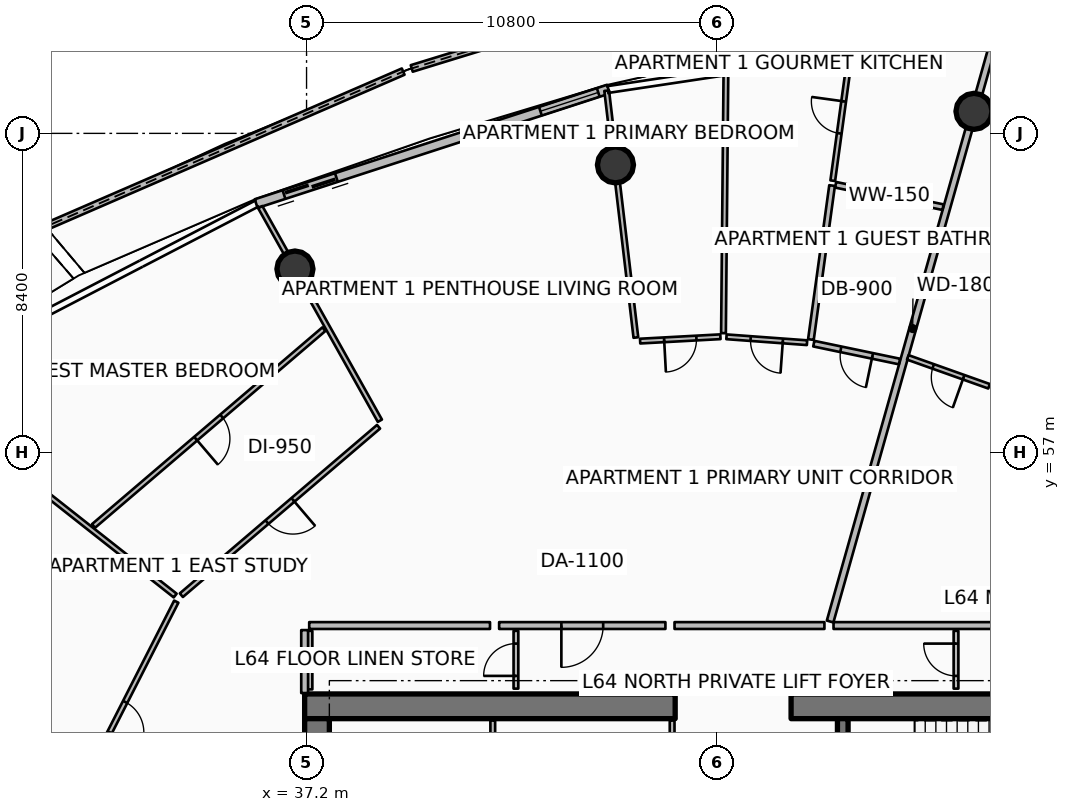
"""IFC4 building model, lengths in metres.
Left out: names, types, materials, properties, quantities, classifications, styles, units other than length and angle.
Written with IfcOpenShell. Run it as: python <this file> out.ifc"""

import sys

from ifc_helpers import new_model, si_unit, direction, frame, frame_2d, origin, origin_2d, place, context, subcontext, project, spatial, polyline, rectangle, circle, outline, extrude, element, fill, save


model = new_model("IFC4")
c1 = context("Model", 3, precision=1e-05, world=origin(), true_north=direction((0.0, 1.0)))
c2 = subcontext(c1, "Body", "Model", "MODEL_VIEW")
j1 = project(units=[si_unit("LENGTHUNIT", "METRE"), si_unit("PLANEANGLEUNIT", "RADIAN")], contexts=[c1])
p1 = place(None, origin())
s1 = spatial("IfcSite", under=j1, at=p1, CompositionType="ELEMENT")
p2 = place(p1, origin())
s2 = spatial("IfcBuilding", under=s1, at=p2, CompositionType="ELEMENT")
p3 = place(p2, frame((0.0, 0.0, 255.95)))
s3 = spatial("IfcBuildingStorey", under=s2, at=p3, CompositionType="ELEMENT", Elevation=255.95)
for number, where, z_axis, x_axis in (
    (1, (37.15, 50.325, 0.0), (0.0, 0.0, 1.0), (1.0, 0.0, 0.0)),
    (2, (49.95, 50.325, 0.0), (0.0, 0.0, 1.0), (1.0, 0.0, 0.0)),
):
    element("IfcWall", number, at=place(p3, frame(where, z_axis=z_axis, x_axis=x_axis)), inside=s3, PredefinedType="SHEAR", context=c2, shape_type="SweptSolid", body=[
        extrude(rectangle(XDim=9.75, YDim=0.65, at=frame_2d((4.875, 0.0))), origin(), (0.0, 0.0, 1.0), 3.85),
    ])
p4 = place(p3, frame((37.475, 34.0, 0.0), z_axis=(0.0, 0.0, 1.0), x_axis=(0.0, 1.0, 0.0)))
e3 = element("IfcWall", 3, at=p4, inside=s3, PredefinedType="SHEAR", context=c2, shape_type="SweptSolid", body=[
    extrude(rectangle(XDim=16.0, YDim=0.65, at=frame_2d((8.0, 0.0))), origin(), (0.0, 0.0, 1.0), 3.85),
])
p5 = place(p3, frame((51.31, 46.5, 0.0), z_axis=(0.0, 0.0, 1.0), x_axis=(0.0, 1.0, 0.0)))
e4 = element("IfcWall", 4, at=p5, inside=s3, PredefinedType="SHEAR", context=c2, shape_type="SweptSolid", body=[
    extrude(rectangle(XDim=3.5, YDim=0.28, at=frame_2d((1.75, 0.0))), origin(), (0.0, 0.0, 1.0), 3.85),
])
for number, where, z_axis, x_axis in (
    (5, (54.763, 65.979, 0.0), (0.0, 0.0, 1.0), (1.0, 0.0, 0.0)),
    (6, (45.329, 64.571, 0.0), (0.0, 0.0, 1.0), (1.0, 0.0, 0.0)),
    (7, (36.895, 61.83, 0.0), (0.0, 0.0, 1.0), (1.0, 0.0, 0.0)),
):
    element("IfcColumn", number, at=place(p3, frame(where, z_axis=z_axis, x_axis=x_axis)), inside=s3, PredefinedType="COLUMN", context=c2, shape_type="SweptSolid", body=[
        extrude(circle(Radius=0.475, at=origin_2d()), origin(), (0.0, 0.0, 1.0), 3.59),
    ])
p6 = place(p3, frame((50.047, 70.206, 0.0), z_axis=(0.0, 0.0, 1.0), x_axis=(-0.955884083791, -0.293744137565, 0.0)))
e8 = element("IfcWall", 8, at=p6, inside=s3, PredefinedType="PARAPET", context=c2, shape_type="SweptSolid", body=[
    extrude(outline(polyline([(0.0, 0.0), (10.544, 0.0), (10.544, 1.348), (5.272, 1.562), (0.0, 1.747), (0.0, 0.0)])), frame((0.0, 0.09, 0.0), z_axis=(0.0, -1.0, 0.0), x_axis=(1.0, 0.0, 0.0)), (0.0, 0.0, 1.0), 0.18),
])
p7 = place(p3, frame((39.743, 67.026, 0.0), z_axis=(0.0, 0.0, 1.0), x_axis=(-0.917372888721, -0.398028872119, 0.0)))
e9 = element("IfcWall", 9, at=p7, inside=s3, PredefinedType="PARAPET", context=c2, shape_type="SweptSolid", body=[
    extrude(outline(polyline([(0.0, 0.0), (10.258, 0.0), (10.257, 1.12), (5.129, 1.182), (0.0, 1.348), (0.0, 0.0)])), frame((0.0, 0.09, 0.0), z_axis=(0.0, -1.0, 0.0), x_axis=(1.0, 0.0, 0.0)), (0.0, 0.0, 1.0), 0.18),
])
p8 = place(p3, frame((45.142, 66.564, 0.0), z_axis=(0.0, 0.0, 1.0), x_axis=(-0.951055974609, -0.309018661507, 0.0)))
e10 = element("IfcWall", 10, at=p8, inside=s3, PredefinedType="SOLIDWALL", context=c2, shape_type="SweptSolid", body=[
    extrude(rectangle(XDim=9.745, YDim=0.24, at=frame_2d((4.873, 0.0))), origin(), (0.0, 0.0, 1.0), 2.54),
])
p9 = place(p8, frame((7.525, 0.0, 0.0)))
e11 = element("IfcOpeningElement", 11, at=p9, cuts=e10, PredefinedType="OPENING", context=c2, shape_type="SweptSolid", body=[
    extrude(rectangle(XDim=1.45, YDim=2.15, at=frame_2d((0.725, 1.075))), frame((0.0, 0.13, 0.0), z_axis=(0.0, -1.0, 0.0), x_axis=(1.0, 0.0, 0.0)), (0.0, 0.0, 1.0), 0.26),
])
p10 = place(p8, frame((0.28, 0.0, 0.65)))
e12 = element("IfcOpeningElement", 12, at=p10, cuts=e10, PredefinedType="OPENING", context=c2, shape_type="SweptSolid", body=[
    extrude(rectangle(XDim=1.6, YDim=1.5, at=frame_2d((0.8, 0.75))), frame((0.0, 0.13, 0.0), z_axis=(0.0, -1.0, 0.0), x_axis=(1.0, 0.0, 0.0)), (0.0, 0.0, 1.0), 0.26),
])
for number, where, z_axis, x_axis in (
    (13, (46.82, 47.92, 0.0), (0.0, 0.0, 1.0), (0.0, 1.0, 0.0)),
    (14, (42.1, 47.92, 0.0), (0.0, 0.0, 1.0), (0.0, 1.0, 0.0)),
):
    element("IfcWall", number, at=place(p3, frame(where, z_axis=z_axis, x_axis=x_axis)), inside=s3, PredefinedType="PARTITIONING", context=c2, shape_type="SweptSolid", body=[
        extrude(rectangle(XDim=2.03, YDim=0.125, at=frame_2d((1.015, 0.0))), origin(), (0.0, 0.0, 1.0), 3.03),
    ])
p11 = place(p3, frame((37.29, 50.77, 0.0), z_axis=(0.0, 0.0, 1.0), x_axis=(0.0, 1.0, 0.0)))
e15 = element("IfcWall", 15, at=p11, inside=s3, PredefinedType="PARTITIONING", context=c2, shape_type="SweptSolid", body=[
    extrude(rectangle(XDim=1.54, YDim=0.125, at=frame_2d((0.77, 0.0))), origin(), (0.0, 0.0, 1.0), 3.03),
])
p12 = place(p3, frame((42.71, 50.79, 0.0), z_axis=(0.0, 0.0, 1.0), x_axis=(0.0, 1.0, 0.0)))
e16 = element("IfcWall", 16, at=p12, inside=s3, PredefinedType="PARTITIONING", context=c2, shape_type="SweptSolid", body=[
    extrude(rectangle(XDim=1.52, YDim=0.125, at=frame_2d((0.76, 0.0))), origin(), (0.0, 0.0, 1.0), 2.957),
])
p13 = place(p12, frame((0.335, 0.0, 0.0)))
e17 = element("IfcOpeningElement", 17, at=p13, cuts=e16, PredefinedType="OPENING", context=c2, shape_type="SweptSolid", body=[
    extrude(rectangle(XDim=0.85, YDim=2.06, at=frame_2d((0.425, 1.03))), frame((0.0, 0.073, 0.0), z_axis=(0.0, -1.0, 0.0), x_axis=(1.0, 0.0, 0.0)), (0.0, 0.0, 1.0), 0.145),
])
p14 = place(p3, frame((54.29, 50.79, 0.0), z_axis=(0.0, 0.0, 1.0), x_axis=(0.0, 1.0, 0.0)))
e18 = element("IfcWall", 18, at=p14, inside=s3, PredefinedType="PARTITIONING", context=c2, shape_type="SweptSolid", body=[
    extrude(rectangle(XDim=1.52, YDim=0.125, at=frame_2d((0.76, 0.0))), origin(), (0.0, 0.0, 1.0), 3.03),
])
p15 = place(p14, frame((0.335, 0.0, 0.0)))
e19 = element("IfcOpeningElement", 19, at=p15, cuts=e18, PredefinedType="OPENING", context=c2, shape_type="SweptSolid", body=[
    extrude(rectangle(XDim=0.85, YDim=2.06, at=frame_2d((0.425, 1.03))), frame((0.0, 0.073, 0.0), z_axis=(0.0, -1.0, 0.0), x_axis=(1.0, 0.0, 0.0)), (0.0, 0.0, 1.0), 0.145),
])
p16 = place(p3, frame((50.977, 52.556, 0.0), z_axis=(0.0, 0.0, 1.0), x_axis=(0.271442063103, 0.962454781472, 0.0)))
e20 = element("IfcWall", 20, at=p16, inside=s3, PredefinedType="PARTITIONING", context=c2, shape_type="SweptSolid", body=[
    extrude(rectangle(XDim=16.017, YDim=0.18, at=frame_2d((8.008, 0.0))), origin(), (0.0, 0.0, 1.0), 2.957),
])
p17 = place(p3, frame((46.643, 52.45, 0.0), z_axis=(0.0, 0.0, 1.0), x_axis=(-1.0, 0.0, 0.0)))
e21 = element("IfcWall", 21, at=p17, inside=s3, PredefinedType="PARTITIONING", context=c2, shape_type="SweptSolid", body=[
    extrude(rectangle(XDim=4.376, YDim=0.18, at=frame_2d((2.188, 0.0))), origin(), (0.0, 0.0, 1.0), 2.957),
])
p18 = place(p17, frame((1.638, 0.0, 0.0)))
e22 = element("IfcOpeningElement", 22, at=p18, cuts=e21, PredefinedType="OPENING", context=c2, shape_type="SweptSolid", body=[
    extrude(rectangle(XDim=1.1, YDim=2.1, at=frame_2d((0.55, 1.05))), frame((0.0, 0.1, 0.0), z_axis=(0.0, -1.0, 0.0), x_axis=(1.0, 0.0, 0.0)), (0.0, 0.0, 1.0), 0.2),
])
p19 = place(p3, frame((50.827, 52.45, 0.0), z_axis=(0.0, 0.0, 1.0), x_axis=(-1.0, 0.0, 0.0)))
e23 = element("IfcWall", 23, at=p19, inside=s3, PredefinedType="PARTITIONING", context=c2, shape_type="SweptSolid", body=[
    extrude(rectangle(XDim=3.944, YDim=0.18, at=frame_2d((1.972, 0.0))), origin(), (0.0, 0.0, 1.0), 2.957),
])
p20 = place(p3, frame((45.866, 60.028, 0.0), z_axis=(0.0, 0.0, 1.0), x_axis=(-0.117545094797, 0.993067545885, 0.0)))
e24 = element("IfcWall", 24, at=p20, inside=s3, PredefinedType="PARTITIONING", context=c2, shape_type="SweptSolid", body=[
    extrude(rectangle(XDim=6.541, YDim=0.125, at=frame_2d((3.27, 0.0))), origin(), (0.0, 0.0, 1.0), 2.957),
])
p21 = place(p3, frame((52.803, 59.396, 0.0), z_axis=(0.0, 0.0, 1.0), x_axis=(-0.978903645483, 0.204322423784, 0.0)))
e25 = element("IfcWall", 25, at=p21, inside=s3, PredefinedType="PARTITIONING", context=c2, shape_type="SweptSolid", body=[
    extrude(rectangle(XDim=2.304, YDim=0.15, at=frame_2d((1.152, 0.0))), origin(), (0.0, 0.0, 1.0), 2.957),
])
p22 = place(p21, frame((0.727, 0.0, 0.0)))
e26 = element("IfcOpeningElement", 26, at=p22, cuts=e25, PredefinedType="OPENING", context=c2, shape_type="SweptSolid", body=[
    extrude(rectangle(XDim=0.85, YDim=2.06, at=frame_2d((0.425, 1.03))), frame((0.0, 0.085, 0.0), z_axis=(0.0, -1.0, 0.0), x_axis=(1.0, 0.0, 0.0)), (0.0, 0.0, 1.0), 0.17),
])
p23 = place(p3, frame((53.948, 63.458, 0.0), z_axis=(0.0, 0.0, 1.0), x_axis=(-0.978900129076, 0.204339270075, 0.0)))
e27 = element("IfcWall", 27, at=p23, inside=s3, PredefinedType="PARTITIONING", context=c2, shape_type="SweptSolid", body=[
    extrude(rectangle(XDim=2.886, YDim=0.15, at=frame_2d((1.443, 0.0))), origin(), (0.0, 0.0, 1.0), 2.957),
])
p24 = place(p3, frame((50.472, 59.975, 0.0), z_axis=(0.0, 0.0, 1.0), x_axis=(0.136221269786, 0.990678437061, 0.0)))
e28 = element("IfcWall", 28, at=p24, inside=s3, PredefinedType="PARTITIONING", context=c2, shape_type="SweptSolid", body=[
    extrude(rectangle(XDim=4.09, YDim=0.15, at=frame_2d((2.045, 0.0))), origin(), (0.0, 0.0, 1.0), 3.03),
])
p25 = place(p3, frame((51.047, 64.156, 0.0), z_axis=(0.0, 0.0, 1.0), x_axis=(0.13615601298, 0.990687407879, 0.0)))
e29 = element("IfcWall", 29, at=p25, inside=s3, PredefinedType="PARTITIONING", context=c2, shape_type="SweptSolid", body=[
    extrude(rectangle(XDim=3.364, YDim=0.125, at=frame_2d((1.682, 0.0))), origin(), (0.0, 0.0, 1.0), 3.03),
])
p26 = place(p25, frame((1.257, 0.0, 0.0)))
e30 = element("IfcOpeningElement", 30, at=p26, cuts=e29, PredefinedType="OPENING", context=c2, shape_type="SweptSolid", body=[
    extrude(rectangle(XDim=0.85, YDim=2.06, at=frame_2d((0.425, 1.03))), frame((0.0, 0.073, 0.0), z_axis=(0.0, -1.0, 0.0), x_axis=(1.0, 0.0, 0.0)), (0.0, 0.0, 1.0), 0.145),
])
p27 = place(p3, frame((48.171, 60.143, 0.0), z_axis=(0.0, 0.0, 1.0), x_axis=(0.009441272277, 0.999955430196, 0.0)))
e31 = element("IfcWall", 31, at=p27, inside=s3, PredefinedType="PARTITIONING", context=c2, shape_type="SweptSolid", body=[
    extrude(rectangle(XDim=6.853, YDim=0.125, at=frame_2d((3.426, 0.0))), origin(), (0.0, 0.0, 1.0), 3.03),
])
p28 = place(p3, frame((50.37, 59.892, 0.0), z_axis=(0.0, 0.0, 1.0), x_axis=(-0.997336577358, 0.072936626353, 0.0)))
e32 = element("IfcWall", 32, at=p28, inside=s3, PredefinedType="PARTITIONING", context=c2, shape_type="SweptSolid", body=[
    extrude(rectangle(XDim=2.125, YDim=0.125, at=frame_2d((1.063, 0.0))), origin(), (0.0, 0.0, 1.0), 3.03),
])
p29 = place(p28, frame((0.638, 0.0, 0.0)))
e33 = element("IfcOpeningElement", 33, at=p29, cuts=e32, PredefinedType="OPENING", context=c2, shape_type="SweptSolid", body=[
    extrude(rectangle(XDim=0.85, YDim=2.06, at=frame_2d((0.425, 1.03))), frame((0.0, 0.073, 0.0), z_axis=(0.0, -1.0, 0.0), x_axis=(1.0, 0.0, 0.0)), (0.0, 0.0, 1.0), 0.145),
])
p30 = place(p3, frame((48.09, 60.049, 0.0), z_axis=(0.0, 0.0, 1.0), x_axis=(-0.998534362098, -0.054121416367, 0.0)))
e34 = element("IfcWall", 34, at=p30, inside=s3, PredefinedType="PARTITIONING", context=c2, shape_type="SweptSolid", body=[
    extrude(rectangle(XDim=2.116, YDim=0.125, at=frame_2d((1.058, 0.0))), origin(), (0.0, 0.0, 1.0), 3.03),
])
p31 = place(p30, frame((0.633, 0.0, 0.0)))
e35 = element("IfcOpeningElement", 35, at=p31, cuts=e34, PredefinedType="OPENING", context=c2, shape_type="SweptSolid", body=[
    extrude(rectangle(XDim=0.85, YDim=2.06, at=frame_2d((0.425, 1.03))), frame((0.0, 0.073, 0.0), z_axis=(0.0, -1.0, 0.0), x_axis=(1.0, 0.0, 0.0)), (0.0, 0.0, 1.0), 0.145),
])
p32 = place(p3, frame((42.028, 52.45, 0.0), z_axis=(0.0, 0.0, 1.0), x_axis=(-1.0, 0.0, 0.0)))
e36 = element("IfcWall", 36, at=p32, inside=s3, PredefinedType="PARTITIONING", context=c2, shape_type="SweptSolid", body=[
    extrude(rectangle(XDim=4.758, YDim=0.18, at=frame_2d((2.379, 0.0))), origin(), (0.0, 0.0, 1.0), 2.957),
])
p33 = place(p3, frame((37.15, 52.33, 0.0), z_axis=(0.0, 0.0, 1.0), x_axis=(0.0, -1.0, 0.0)))
e37 = element("IfcWall", 37, at=p33, inside=s3, PredefinedType="PARTITIONING", context=c2, shape_type="SweptSolid", body=[
    extrude(rectangle(XDim=1.656, YDim=0.18, at=frame_2d((0.828, 0.0))), origin(), (0.0, 0.0, 1.0), 2.957),
])
p34 = place(p3, frame((39.129, 57.839, 0.0), z_axis=(0.0, 0.0, 1.0), x_axis=(-0.488617220279, 0.872498259051, 0.0)))
e38 = element("IfcWall", 38, at=p34, inside=s3, PredefinedType="PARTITIONING", context=c2, shape_type="SweptSolid", body=[
    extrude(rectangle(XDim=6.441, YDim=0.125, at=frame_2d((3.22, 0.0))), origin(), (0.0, 0.0, 1.0), 2.957),
])
p35 = place(p3, frame((39.095, 57.681, 0.0), z_axis=(0.0, 0.0, 1.0), x_axis=(-0.760396866349, -0.649458702033, 0.0)))
e39 = element("IfcWall", 39, at=p35, inside=s3, PredefinedType="PARTITIONING", context=c2, shape_type="SweptSolid", body=[
    extrude(rectangle(XDim=6.824, YDim=0.125, at=frame_2d((3.412, 0.0))), origin(), (0.0, 0.0, 1.0), 2.957),
])
p36 = place(p35, frame((2.962, 0.0, 0.0)))
e40 = element("IfcOpeningElement", 40, at=p36, cuts=e39, PredefinedType="OPENING", context=c2, shape_type="SweptSolid", body=[
    extrude(rectangle(XDim=0.9, YDim=2.08, at=frame_2d((0.45, 1.04))), frame((0.0, 0.073, 0.0), z_axis=(0.0, -1.0, 0.0), x_axis=(1.0, 0.0, 0.0)), (0.0, 0.0, 1.0), 0.145),
])
p37 = place(p3, frame((37.657, 60.248, 0.0), z_axis=(0.0, 0.0, 1.0), x_axis=(-0.76041400447, -0.649438635905, 0.0)))
e41 = element("IfcWall", 41, at=p37, inside=s3, PredefinedType="PARTITIONING", context=c2, shape_type="SweptSolid", body=[
    extrude(rectangle(XDim=7.973, YDim=0.125, at=frame_2d((3.986, 0.0))), origin(), (0.0, 0.0, 1.0), 2.957),
])
p38 = place(p37, frame((3.536, 0.0, 0.0)))
e42 = element("IfcOpeningElement", 42, at=p38, cuts=e41, PredefinedType="OPENING", context=c2, shape_type="SweptSolid", body=[
    extrude(rectangle(XDim=0.9, YDim=2.08, at=frame_2d((0.45, 1.04))), frame((0.0, 0.073, 0.0), z_axis=(0.0, -1.0, 0.0), x_axis=(1.0, 0.0, 0.0)), (0.0, 0.0, 1.0), 0.145),
])
p39 = place(p3, frame((33.743, 53.239, 0.0), z_axis=(0.0, 0.0, 1.0), x_axis=(-0.785324118062, 0.619084832305, 0.0)))
e43 = element("IfcWall", 43, at=p39, inside=s3, PredefinedType="PARTITIONING", context=c2, shape_type="SweptSolid", body=[
    extrude(rectangle(XDim=8.931, YDim=0.125, at=frame_2d((4.465, 0.0))), origin(), (0.0, 0.0, 1.0), 2.957),
])
p40 = place(p3, frame((33.772, 53.079, 0.0), z_axis=(0.0, 0.0, 1.0), x_axis=(-0.454012060349, -0.890995538181, 0.0)))
e44 = element("IfcWall", 44, at=p40, inside=s3, PredefinedType="PARTITIONING", context=c2, shape_type="SweptSolid", body=[
    extrude(rectangle(XDim=6.824, YDim=0.125, at=frame_2d((3.412, 0.0))), origin(), (0.0, 0.0, 1.0), 2.957),
])
p41 = place(p40, frame((2.962, 0.0, 0.0)))
e45 = element("IfcOpeningElement", 45, at=p41, cuts=e44, PredefinedType="OPENING", context=c2, shape_type="SweptSolid", body=[
    extrude(rectangle(XDim=0.9, YDim=2.08, at=frame_2d((0.45, 1.04))), frame((0.0, 0.073, 0.0), z_axis=(0.0, -1.0, 0.0), x_axis=(1.0, 0.0, 0.0)), (0.0, 0.0, 1.0), 0.145),
])
p42 = place(p3, frame((30.528, 46.928, 0.0), z_axis=(0.0, 0.0, 1.0), x_axis=(-0.962454146261, 0.271444315367, 0.0)))
e46 = element("IfcWall", 46, at=p42, inside=s3, PredefinedType="PARTITIONING", context=c2, shape_type="SweptSolid", body=[
    extrude(rectangle(XDim=11.342, YDim=0.125, at=frame_2d((5.671, 0.0))), origin(), (0.0, 0.0, 1.0), 2.957),
])
p43 = place(p3, frame((56.118, 52.45, 0.0), z_axis=(0.0, 0.0, 1.0), x_axis=(-1.0, 0.0, 0.0)))
e47 = element("IfcWall", 47, at=p43, inside=s3, PredefinedType="PARTITIONING", context=c2, shape_type="SweptSolid", body=[
    extrude(rectangle(XDim=5.051, YDim=0.18, at=frame_2d((2.525, 0.0))), origin(), (0.0, 0.0, 1.0), 2.957),
])
p44 = place(p3, frame((55.159, 58.746, 0.0), z_axis=(0.0, 0.0, 1.0), x_axis=(-0.942227512781, 0.334973602181, 0.0)))
e48 = element("IfcWall", 48, at=p44, inside=s3, PredefinedType="PARTITIONING", context=c2, shape_type="SweptSolid", body=[
    extrude(rectangle(XDim=2.27, YDim=0.125, at=frame_2d((1.135, 0.0))), origin(), (0.0, 0.0, 1.0), 2.957),
])
p45 = place(p44, frame((0.71, 0.0, 0.0)))
e49 = element("IfcOpeningElement", 49, at=p45, cuts=e48, PredefinedType="OPENING", context=c2, shape_type="SweptSolid", body=[
    extrude(rectangle(XDim=0.85, YDim=2.06, at=frame_2d((0.425, 1.03))), frame((0.0, 0.073, 0.0), z_axis=(0.0, -1.0, 0.0), x_axis=(1.0, 0.0, 0.0)), (0.0, 0.0, 1.0), 0.145),
])
p46 = place(p9, origin())
e50 = element("IfcDoor", 50, at=p46, inside=s3, OperationType="DOUBLE_DOOR_SLIDING", PredefinedType="DOOR", context=c2, shape_type="SweptSolid", body=[
    extrude(rectangle(XDim=1.45, YDim=2.15, at=frame_2d((0.725, 1.075))), frame((0.0, 0.025, 0.0), z_axis=(0.0, -1.0, 0.0), x_axis=(1.0, 0.0, 0.0)), (0.0, 0.0, 1.0), 0.05),
])
fill(e11, e50)
p47 = place(p10, origin())
e51 = element("IfcWindow", 51, at=p47, inside=s3, PartitioningType="SINGLE_PANEL", PredefinedType="WINDOW", context=c2, shape_type="SweptSolid", body=[
    extrude(rectangle(XDim=1.6, YDim=1.5, at=frame_2d((0.8, 0.75))), frame((0.0, 0.03, 0.0), z_axis=(0.0, -1.0, 0.0), x_axis=(1.0, 0.0, 0.0)), (0.0, 0.0, 1.0), 0.06),
])
fill(e12, e51)
p48 = place(p13, origin())
e52 = element("IfcDoor", 52, at=p48, inside=s3, OperationType="SINGLE_SWING_LEFT", PredefinedType="DOOR", context=c2, shape_type="SweptSolid", body=[
    extrude(rectangle(XDim=0.85, YDim=2.06, at=frame_2d((0.425, 1.03))), frame((0.0, 0.025, 0.0), z_axis=(0.0, -1.0, 0.0), x_axis=(1.0, 0.0, 0.0)), (0.0, 0.0, 1.0), 0.05),
])
fill(e17, e52)
p49 = place(p15, origin())
e53 = element("IfcDoor", 53, at=p49, inside=s3, OperationType="SINGLE_SWING_RIGHT", PredefinedType="DOOR", context=c2, shape_type="SweptSolid", body=[
    extrude(rectangle(XDim=0.85, YDim=2.06, at=frame_2d((0.425, 1.03))), frame((0.0, 0.025, 0.0), z_axis=(0.0, -1.0, 0.0), x_axis=(1.0, 0.0, 0.0)), (0.0, 0.0, 1.0), 0.05),
])
fill(e19, e53)
p50 = place(p18, origin())
e54 = element("IfcDoor", 54, at=p50, inside=s3, OperationType="SINGLE_SWING_RIGHT", PredefinedType="DOOR", context=c2, shape_type="SweptSolid", body=[
    extrude(rectangle(XDim=1.1, YDim=2.1, at=frame_2d((0.55, 1.05))), frame((0.0, 0.025, 0.0), z_axis=(0.0, -1.0, 0.0), x_axis=(1.0, 0.0, 0.0)), (0.0, 0.0, 1.0), 0.05),
])
fill(e22, e54)
p51 = place(p22, origin())
e55 = element("IfcDoor", 55, at=p51, inside=s3, OperationType="SINGLE_SWING_LEFT", PredefinedType="DOOR", context=c2, shape_type="SweptSolid", body=[
    extrude(rectangle(XDim=0.85, YDim=2.06, at=frame_2d((0.425, 1.03))), frame((0.0, 0.025, 0.0), z_axis=(0.0, -1.0, 0.0), x_axis=(1.0, 0.0, 0.0)), (0.0, 0.0, 1.0), 0.05),
])
fill(e26, e55)
p52 = place(p26, origin())
e56 = element("IfcDoor", 56, at=p52, inside=s3, OperationType="SINGLE_SWING_RIGHT", PredefinedType="DOOR", context=c2, shape_type="SweptSolid", body=[
    extrude(rectangle(XDim=0.85, YDim=2.06, at=frame_2d((0.425, 1.03))), frame((0.0, 0.025, 0.0), z_axis=(0.0, -1.0, 0.0), x_axis=(1.0, 0.0, 0.0)), (0.0, 0.0, 1.0), 0.05),
])
fill(e30, e56)
p53 = place(p29, origin())
e57 = element("IfcDoor", 57, at=p53, inside=s3, OperationType="SINGLE_SWING_LEFT", PredefinedType="DOOR", context=c2, shape_type="SweptSolid", body=[
    extrude(rectangle(XDim=0.85, YDim=2.06, at=frame_2d((0.425, 1.03))), frame((0.0, 0.025, 0.0), z_axis=(0.0, -1.0, 0.0), x_axis=(1.0, 0.0, 0.0)), (0.0, 0.0, 1.0), 0.05),
])
fill(e33, e57)
p54 = place(p31, origin())
e58 = element("IfcDoor", 58, at=p54, inside=s3, OperationType="SINGLE_SWING_RIGHT", PredefinedType="DOOR", context=c2, shape_type="SweptSolid", body=[
    extrude(rectangle(XDim=0.85, YDim=2.06, at=frame_2d((0.425, 1.03))), frame((0.0, 0.025, 0.0), z_axis=(0.0, -1.0, 0.0), x_axis=(1.0, 0.0, 0.0)), (0.0, 0.0, 1.0), 0.05),
])
fill(e35, e58)
p55 = place(p36, origin())
e59 = element("IfcDoor", 59, at=p55, inside=s3, OperationType="SINGLE_SWING_LEFT", PredefinedType="DOOR", context=c2, shape_type="SweptSolid", body=[
    extrude(rectangle(XDim=0.9, YDim=2.08, at=frame_2d((0.45, 1.04))), frame((0.0, 0.025, 0.0), z_axis=(0.0, -1.0, 0.0), x_axis=(1.0, 0.0, 0.0)), (0.0, 0.0, 1.0), 0.05),
])
fill(e40, e59)
p56 = place(p38, origin())
e60 = element("IfcDoor", 60, at=p56, inside=s3, OperationType="SINGLE_SWING_RIGHT", PredefinedType="DOOR", context=c2, shape_type="SweptSolid", body=[
    extrude(rectangle(XDim=0.9, YDim=2.08, at=frame_2d((0.45, 1.04))), frame((0.0, 0.025, 0.0), z_axis=(0.0, -1.0, 0.0), x_axis=(1.0, 0.0, 0.0)), (0.0, 0.0, 1.0), 0.05),
])
fill(e42, e60)
p57 = place(p41, origin())
e61 = element("IfcDoor", 61, at=p57, inside=s3, OperationType="SINGLE_SWING_RIGHT", PredefinedType="DOOR", context=c2, shape_type="SweptSolid", body=[
    extrude(rectangle(XDim=0.9, YDim=2.08, at=frame_2d((0.45, 1.04))), frame((0.0, 0.025, 0.0), z_axis=(0.0, -1.0, 0.0), x_axis=(1.0, 0.0, 0.0)), (0.0, 0.0, 1.0), 0.05),
])
fill(e45, e61)
p58 = place(p45, origin())
e62 = element("IfcDoor", 62, at=p58, inside=s3, OperationType="SINGLE_SWING_LEFT", PredefinedType="DOOR", context=c2, shape_type="SweptSolid", body=[
    extrude(rectangle(XDim=0.85, YDim=2.06, at=frame_2d((0.425, 1.03))), frame((0.0, 0.025, 0.0), z_axis=(0.0, -1.0, 0.0), x_axis=(1.0, 0.0, 0.0)), (0.0, 0.0, 1.0), 0.05),
])
fill(e49, e62)
save(model, sys.argv[1])
